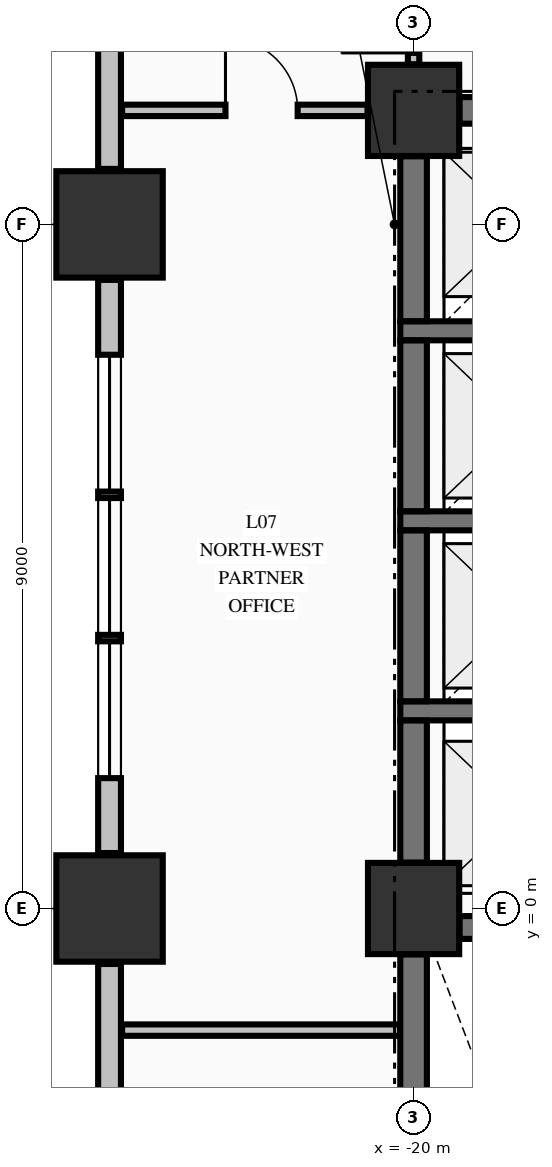
"""IFC4 building model, lengths in metres.
Left out: names, types, materials, properties, quantities, classifications, styles, units other than length and angle.
Written with IfcOpenShell. Run it as: python <this file> out.ifc"""

import sys

from ifc_helpers import new_model, si_unit, direction, frame, frame_2d, origin, origin_2d, place, context, subcontext, project, spatial, rectangle, extrude, element, fill, save


model = new_model("IFC4")
c1 = context("Model", 3, precision=1e-05, world=origin(), true_north=direction((0.0, 1.0)))
c2 = subcontext(c1, "Body", "Model", "MODEL_VIEW")
j1 = project(units=[si_unit("LENGTHUNIT", "METRE"), si_unit("PLANEANGLEUNIT", "RADIAN")], contexts=[c1])
p1 = place(None, origin())
s1 = spatial("IfcSite", under=j1, at=p1, CompositionType="ELEMENT")
p2 = place(p1, origin())
s2 = spatial("IfcBuilding", under=s1, at=p2, CompositionType="ELEMENT")
p3 = place(p2, frame((0.0, 0.0, 34.34)))
s3 = spatial("IfcBuildingStorey", under=s2, at=p3, CompositionType="ELEMENT", Elevation=34.34)
for number, where, z_axis, x_axis in (
    (1, (-24.0, 0.0, -0.3), (0.0, 0.0, 1.0), (1.0, 0.0, 0.0)),
    (2, (-24.0, 9.0, -0.3), (0.0, 0.0, 1.0), (1.0, 0.0, 0.0)),
):
    element("IfcColumn", number, at=place(p3, frame(where, z_axis=z_axis, x_axis=x_axis)), inside=s3, PredefinedType="COLUMN", context=c2, shape_type="SweptSolid", body=[
        extrude(rectangle(XDim=1.4, YDim=1.4, at=origin_2d()), origin(), (0.0, 0.0, 1.0), 3.62),
    ])
for number, where, z_axis, x_axis in (
    (3, (-20.0, 10.5, -0.3), (0.0, 0.0, 1.0), (1.0, 0.0, 0.0)),
    (4, (-20.0, 0.0, -0.3), (0.0, 0.0, 1.0), (1.0, 0.0, 0.0)),
):
    element("IfcColumn", number, at=place(p3, frame(where, z_axis=z_axis, x_axis=x_axis)), inside=s3, PredefinedType="COLUMN", context=c2, shape_type="SweptSolid", body=[
        extrude(rectangle(XDim=1.2, YDim=1.2, at=origin_2d()), origin(), (0.0, 0.0, 1.0), 3.62),
    ])
p4 = place(p3, frame((-24.0, -0.73, 0.0), z_axis=(0.0, 0.0, 1.0), x_axis=(0.0, -1.0, 0.0)))
e5 = element("IfcWall", 5, at=p4, inside=s3, PredefinedType="STANDARD", context=c2, shape_type="SweptSolid", body=[
    extrude(rectangle(XDim=7.54, YDim=0.3, at=frame_2d((3.77, 0.0))), origin(), (0.0, 0.0, 1.0), 2.712),
])
p5 = place(p4, frame((2.87, 0.0, 0.78)))
e6 = element("IfcOpeningElement", 6, at=p5, cuts=e5, PredefinedType="OPENING", context=c2, shape_type="SweptSolid", body=[
    extrude(rectangle(XDim=1.8, YDim=1.72, at=frame_2d((0.9, 0.86))), frame((0.0, 0.16, 0.0), z_axis=(0.0, -1.0, 0.0), x_axis=(1.0, 0.0, 0.0)), (0.0, 0.0, 1.0), 0.32),
])
p6 = place(p4, frame((4.755, 0.0, 0.78)))
e7 = element("IfcOpeningElement", 7, at=p6, cuts=e5, PredefinedType="OPENING", context=c2, shape_type="SweptSolid", body=[
    extrude(rectangle(XDim=1.8, YDim=1.72, at=frame_2d((0.9, 0.86))), frame((0.0, 0.16, 0.0), z_axis=(0.0, -1.0, 0.0), x_axis=(1.0, 0.0, 0.0)), (0.0, 0.0, 1.0), 0.32),
])
p7 = place(p3, frame((-24.0, 8.27, 0.0), z_axis=(0.0, 0.0, 1.0), x_axis=(0.0, -1.0, 0.0)))
e8 = element("IfcWall", 8, at=p7, inside=s3, PredefinedType="STANDARD", context=c2, shape_type="SweptSolid", body=[
    extrude(rectangle(XDim=7.54, YDim=0.3, at=frame_2d((3.77, 0.0))), origin(), (0.0, 0.0, 1.0), 2.712),
])
p8 = place(p7, frame((0.985, 0.0, 0.78)))
e9 = element("IfcOpeningElement", 9, at=p8, cuts=e8, PredefinedType="OPENING", context=c2, shape_type="SweptSolid", body=[
    extrude(rectangle(XDim=1.8, YDim=1.72, at=frame_2d((0.9, 0.86))), frame((0.0, 0.16, 0.0), z_axis=(0.0, -1.0, 0.0), x_axis=(1.0, 0.0, 0.0)), (0.0, 0.0, 1.0), 0.32),
])
p9 = place(p7, frame((2.87, 0.0, 0.78)))
e10 = element("IfcOpeningElement", 10, at=p9, cuts=e8, PredefinedType="OPENING", context=c2, shape_type="SweptSolid", body=[
    extrude(rectangle(XDim=1.8, YDim=1.72, at=frame_2d((0.9, 0.86))), frame((0.0, 0.16, 0.0), z_axis=(0.0, -1.0, 0.0), x_axis=(1.0, 0.0, 0.0)), (0.0, 0.0, 1.0), 0.32),
])
p10 = place(p7, frame((4.755, 0.0, 0.78)))
e11 = element("IfcOpeningElement", 11, at=p10, cuts=e8, PredefinedType="OPENING", context=c2, shape_type="SweptSolid", body=[
    extrude(rectangle(XDim=1.8, YDim=1.72, at=frame_2d((0.9, 0.86))), frame((0.0, 0.16, 0.0), z_axis=(0.0, -1.0, 0.0), x_axis=(1.0, 0.0, 0.0)), (0.0, 0.0, 1.0), 0.32),
])
p11 = place(p3, frame((-24.0, 22.27, 0.0), z_axis=(0.0, 0.0, 1.0), x_axis=(0.0, -1.0, 0.0)))
e12 = element("IfcWall", 12, at=p11, inside=s3, PredefinedType="STANDARD", context=c2, shape_type="SweptSolid", body=[
    extrude(rectangle(XDim=12.54, YDim=0.3, at=frame_2d((6.27, 0.0))), origin(), (0.0, 0.0, 1.0), 2.712),
])
p12 = place(p3, frame((-19.396, -0.25, 0.0), z_axis=(0.0, 0.0, 1.0), x_axis=(1.0, 0.0, 0.0)))
e13 = element("IfcWall", 13, at=p12, inside=s3, PredefinedType="SHEAR", context=c2, shape_type="SweptSolid", body=[
    extrude(rectangle(XDim=7.792, YDim=0.3, at=frame_2d((3.896, 0.0))), origin(), (0.0, 0.0, 1.0), 3.32),
])
p13 = place(p12, frame((5.696, 0.0, 0.0)))
e14 = element("IfcOpeningElement", 14, at=p13, cuts=e13, PredefinedType="OPENING", context=c2, shape_type="SweptSolid", body=[
    extrude(rectangle(XDim=1.1, YDim=2.15, at=frame_2d((0.55, 1.075))), frame((0.0, 0.16, 0.0), z_axis=(0.0, -1.0, 0.0), x_axis=(1.0, 0.0, 0.0)), (0.0, 0.0, 1.0), 0.32),
])
for number, where, z_axis, x_axis in (
    (15, (-20.175, 2.6, 0.0), (0.0, 0.0, 1.0), (1.0, 0.0, 0.0)),
    (16, (-20.175, 5.1, 0.0), (0.0, 0.0, 1.0), (1.0, 0.0, 0.0)),
    (17, (-20.175, 7.6, 0.0), (0.0, 0.0, 1.0), (1.0, 0.0, 0.0)),
):
    element("IfcWall", number, at=place(p3, frame(where, z_axis=z_axis, x_axis=x_axis)), inside=s3, PredefinedType="SOLIDWALL", context=c2, shape_type="SweptSolid", body=[
        extrude(rectangle(XDim=3.1, YDim=0.25, at=frame_2d((1.55, 0.0))), origin(), (0.0, 0.0, 1.0), 3.32),
    ])
p14 = place(p3, frame((-19.396, 10.5, 0.0), z_axis=(0.0, 0.0, 1.0), x_axis=(1.0, 0.0, 0.0)))
e18 = element("IfcWall", 18, at=p14, inside=s3, PredefinedType="SHEAR", context=c2, shape_type="SweptSolid", body=[
    extrude(rectangle(XDim=4.696, YDim=0.35, at=frame_2d((2.348, 0.0))), origin(), (0.0, 0.0, 1.0), 3.32),
])
p15 = place(p14, frame((2.796, 0.0, 0.0)))
e19 = element("IfcOpeningElement", 19, at=p15, cuts=e18, PredefinedType="OPENING", context=c2, shape_type="SweptSolid", body=[
    extrude(rectangle(XDim=1.2, YDim=2.15, at=frame_2d((0.6, 1.075))), frame((0.0, 0.185, 0.0), z_axis=(0.0, -1.0, 0.0), x_axis=(1.0, 0.0, 0.0)), (0.0, 0.0, 1.0), 0.37),
])
p16 = place(p3, frame((-23.835, -1.6, 0.0), z_axis=(0.0, 0.0, 1.0), x_axis=(1.0, 0.0, 0.0)))
e20 = element("IfcWall", 20, at=p16, inside=s3, PredefinedType="PARTITIONING", context=c2, shape_type="SweptSolid", body=[
    extrude(rectangle(XDim=3.657, YDim=0.15, at=frame_2d((1.829, 0.0))), origin(), (0.0, 0.0, 1.0), 3.32),
])
p17 = place(p3, frame((-23.835, 10.5, 0.0), z_axis=(0.0, 0.0, 1.0), x_axis=(1.0, 0.0, 0.0)))
e21 = element("IfcWall", 21, at=p17, inside=s3, PredefinedType="PARTITIONING", context=c2, shape_type="SweptSolid", body=[
    extrude(rectangle(XDim=3.229, YDim=0.15, at=frame_2d((1.615, 0.0))), origin(), (0.0, 0.0, 1.0), 3.32),
])
p18 = place(p17, frame((1.36, 0.0, 0.0)))
e22 = element("IfcOpeningElement", 22, at=p18, cuts=e21, PredefinedType="OPENING", context=c2, shape_type="SweptSolid", body=[
    extrude(rectangle(XDim=0.95, YDim=2.15, at=frame_2d((0.475, 1.075))), frame((0.0, 0.085, 0.0), z_axis=(0.0, -1.0, 0.0), x_axis=(1.0, 0.0, 0.0)), (0.0, 0.0, 1.0), 0.17),
])
p19 = place(p3, frame((-20.0, -9.346, 0.0), z_axis=(0.0, 0.0, 1.0), x_axis=(0.0, 1.0, 0.0)))
e23 = element("IfcWall", 23, at=p19, inside=s3, PredefinedType="SHEAR", context=c2, shape_type="SweptSolid", body=[
    extrude(rectangle(XDim=8.742, YDim=0.35, at=frame_2d((4.371, 0.0))), origin(), (0.0, 0.0, 1.0), 3.32),
])
p20 = place(p3, frame((-20.0, 0.604, 0.0), z_axis=(0.0, 0.0, 1.0), x_axis=(0.0, 1.0, 0.0)))
e24 = element("IfcWall", 24, at=p20, inside=s3, PredefinedType="SHEAR", context=c2, shape_type="SweptSolid", body=[
    extrude(rectangle(XDim=1.869, YDim=0.35, at=frame_2d((0.935, 0.0))), origin(), (0.0, 0.0, 1.0), 3.32),
])
for number, where, z_axis, x_axis in (
    (25, (-20.0, 2.727, 0.0), (0.0, 0.0, 1.0), (0.0, 1.0, 0.0)),
    (26, (-20.0, 5.227, 0.0), (0.0, 0.0, 1.0), (0.0, 1.0, 0.0)),
):
    element("IfcWall", number, at=place(p3, frame(where, z_axis=z_axis, x_axis=x_axis)), inside=s3, PredefinedType="SHEAR", context=c2, shape_type="SweptSolid", body=[
        extrude(rectangle(XDim=2.246, YDim=0.35, at=frame_2d((1.123, 0.0))), origin(), (0.0, 0.0, 1.0), 3.32),
    ])
p21 = place(p3, frame((-20.0, 7.727, 0.0), z_axis=(0.0, 0.0, 1.0), x_axis=(0.0, 1.0, 0.0)))
e27 = element("IfcWall", 27, at=p21, inside=s3, PredefinedType="SHEAR", context=c2, shape_type="SweptSolid", body=[
    extrude(rectangle(XDim=2.169, YDim=0.35, at=frame_2d((1.084, 0.0))), origin(), (0.0, 0.0, 1.0), 3.32),
])
p22 = place(p3, frame((-20.0, 11.106, 0.0), z_axis=(0.0, 0.0, 1.0), x_axis=(0.0, 1.0, 0.0)))
e28 = element("IfcWall", 28, at=p22, inside=s3, PredefinedType="PARTITIONING", context=c2, shape_type="SweptSolid", body=[
    extrude(rectangle(XDim=1.366, YDim=0.15, at=frame_2d((0.683, 0.0))), origin(), (0.0, 0.0, 1.0), 3.32),
])
p23 = place(p22, frame((0.15, 0.0, 0.0)))
e29 = element("IfcOpeningElement", 29, at=p23, cuts=e28, PredefinedType="OPENING", context=c2, shape_type="SweptSolid", body=[
    extrude(rectangle(XDim=0.95, YDim=2.15, at=frame_2d((0.475, 1.075))), frame((0.0, 0.085, 0.0), z_axis=(0.0, -1.0, 0.0), x_axis=(1.0, 0.0, 0.0)), (0.0, 0.0, 1.0), 0.17),
])
p24 = place(p8, origin())
e30 = element("IfcWindow", 30, at=p24, inside=s3, PartitioningType="SINGLE_PANEL", PredefinedType="WINDOW", context=c2, shape_type="SweptSolid", body=[
    extrude(rectangle(XDim=1.8, YDim=1.72, at=frame_2d((0.9, 0.86))), frame((0.0, 0.03, 0.0), z_axis=(0.0, -1.0, 0.0), x_axis=(1.0, 0.0, 0.0)), (0.0, 0.0, 1.0), 0.06),
])
fill(e9, e30)
p25 = place(p9, origin())
e31 = element("IfcWindow", 31, at=p25, inside=s3, PartitioningType="SINGLE_PANEL", PredefinedType="WINDOW", context=c2, shape_type="SweptSolid", body=[
    extrude(rectangle(XDim=1.8, YDim=1.72, at=frame_2d((0.9, 0.86))), frame((0.0, 0.03, 0.0), z_axis=(0.0, -1.0, 0.0), x_axis=(1.0, 0.0, 0.0)), (0.0, 0.0, 1.0), 0.06),
])
fill(e10, e31)
p26 = place(p10, origin())
e32 = element("IfcWindow", 32, at=p26, inside=s3, PartitioningType="SINGLE_PANEL", PredefinedType="WINDOW", context=c2, shape_type="SweptSolid", body=[
    extrude(rectangle(XDim=1.8, YDim=1.72, at=frame_2d((0.9, 0.86))), frame((0.0, 0.03, 0.0), z_axis=(0.0, -1.0, 0.0), x_axis=(1.0, 0.0, 0.0)), (0.0, 0.0, 1.0), 0.06),
])
fill(e11, e32)
p27 = place(p23, origin())
e33 = element("IfcDoor", 33, at=p27, inside=s3, OperationType="SINGLE_SWING_LEFT", PredefinedType="DOOR", context=c2, shape_type="SweptSolid", body=[
    extrude(rectangle(XDim=0.95, YDim=2.15, at=frame_2d((0.475, 1.075))), frame((0.0, 0.025, 0.0), z_axis=(0.0, -1.0, 0.0), x_axis=(1.0, 0.0, 0.0)), (0.0, 0.0, 1.0), 0.05),
])
fill(e29, e33)
p28 = place(p18, origin())
e34 = element("IfcDoor", 34, at=p28, inside=s3, OperationType="SINGLE_SWING_LEFT", PredefinedType="DOOR", context=c2, shape_type="SweptSolid", body=[
    extrude(rectangle(XDim=0.95, YDim=2.15, at=frame_2d((0.475, 1.075))), frame((0.0, 0.025, 0.0), z_axis=(0.0, -1.0, 0.0), x_axis=(1.0, 0.0, 0.0)), (0.0, 0.0, 1.0), 0.05),
])
fill(e22, e34)
save(model, sys.argv[1])
